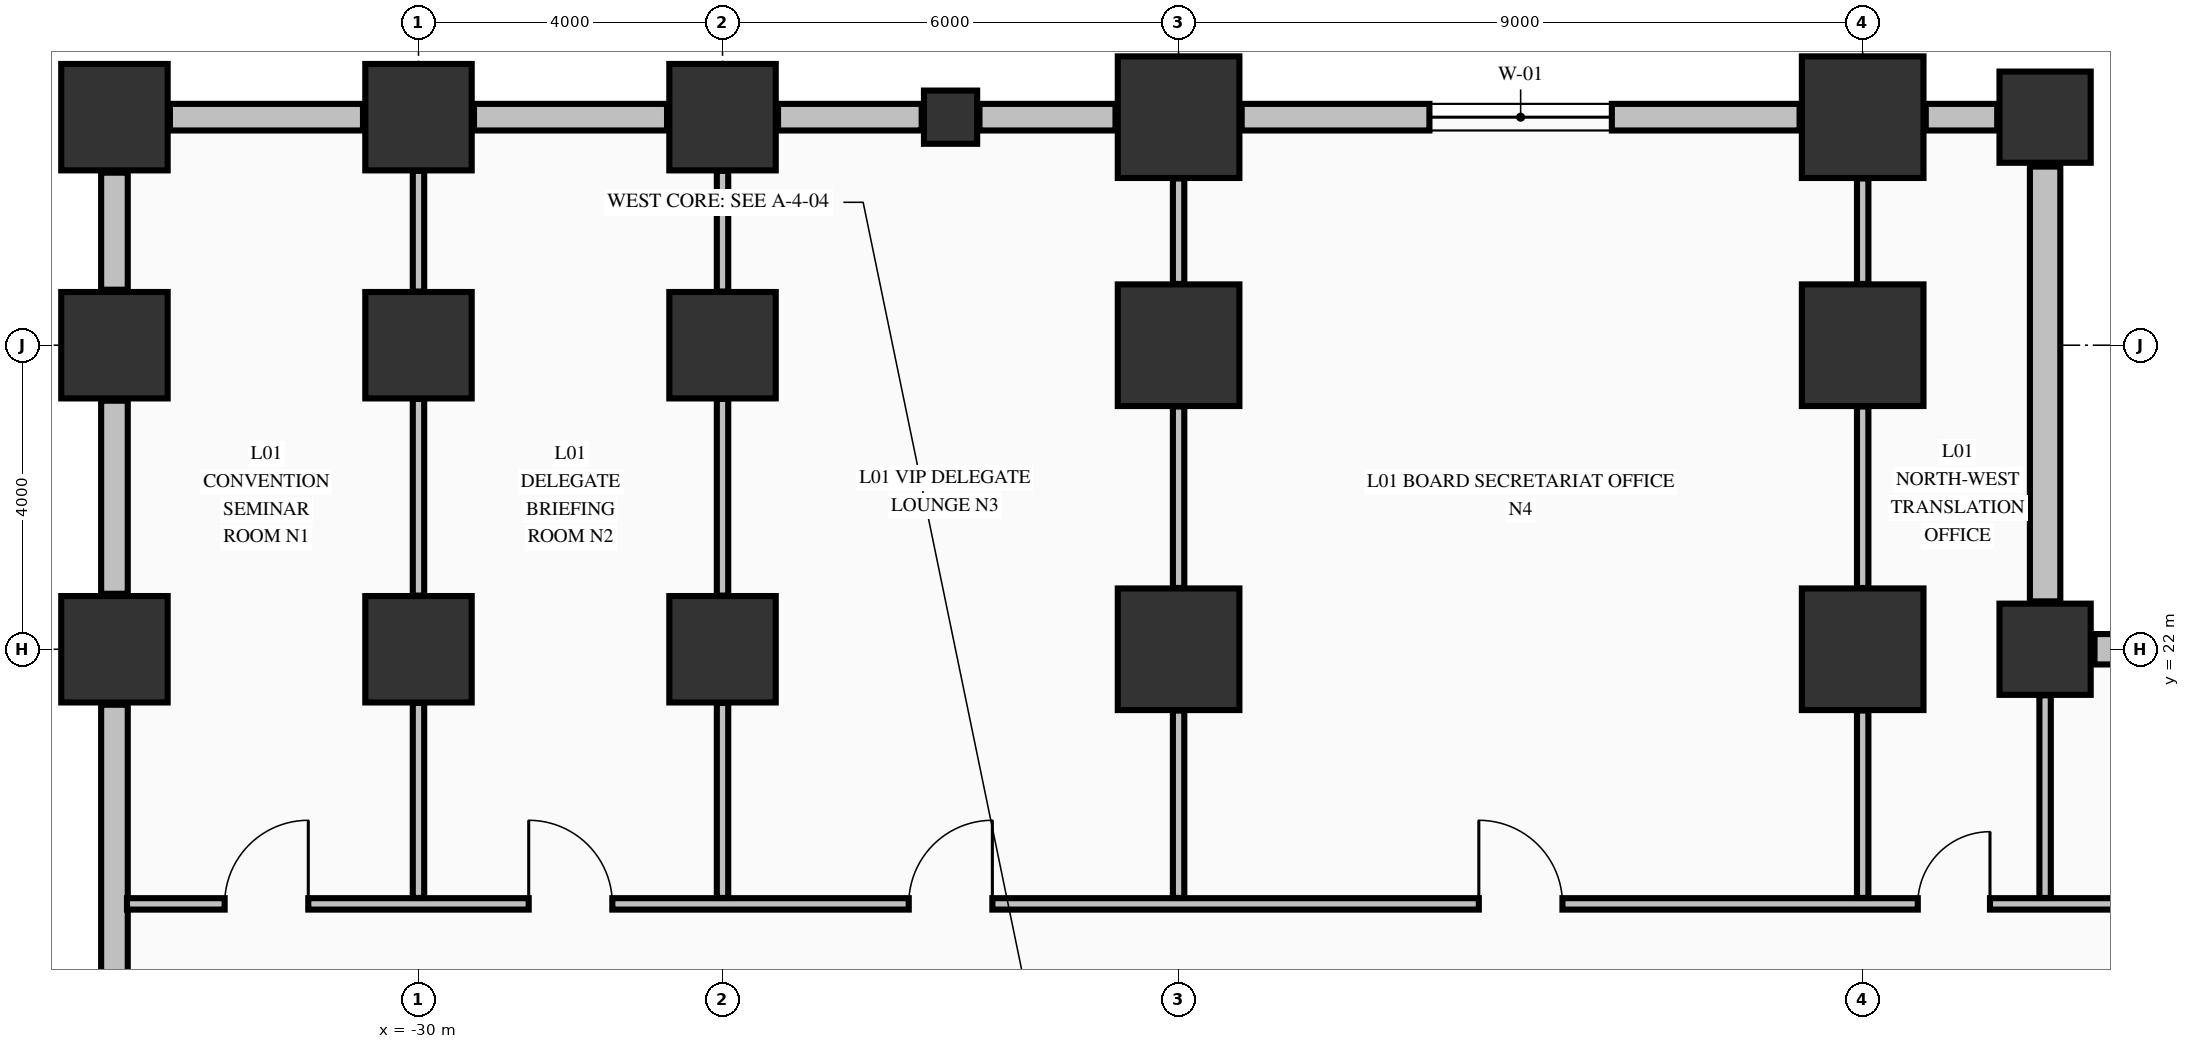
"""IFC4 building model, lengths in metres.
Left out: names, types, materials, properties, quantities, classifications, styles, units other than length and angle.
Written with IfcOpenShell. Run it as: python <this file> out.ifc"""

import sys

from ifc_helpers import new_model, si_unit, direction, frame, frame_2d, origin, origin_2d, place, context, subcontext, project, spatial, rectangle, extrude, element, fill, save


model = new_model("IFC4")
c1 = context("Model", 3, precision=1e-05, world=origin(), true_north=direction((0.0, 1.0)))
c2 = subcontext(c1, "Body", "Model", "MODEL_VIEW")
j1 = project(units=[si_unit("LENGTHUNIT", "METRE"), si_unit("PLANEANGLEUNIT", "RADIAN")], contexts=[c1])
p1 = place(None, origin())
s1 = spatial("IfcSite", under=j1, at=p1, CompositionType="ELEMENT")
p2 = place(p1, origin())
s2 = spatial("IfcBuilding", under=s1, at=p2, CompositionType="ELEMENT")
p3 = place(p2, frame((0.0, 0.0, 5.44)))
s3 = spatial("IfcBuildingStorey", under=s2, at=p3, CompositionType="ELEMENT", Elevation=5.44)
for number, where, z_axis, x_axis in (
    (1, (-34.0, 22.0, 0.0), (0.0, 0.0, 1.0), (1.0, 0.0, 0.0)),
    (2, (-34.0, 26.0, 0.0), (0.0, 0.0, 1.0), (1.0, 0.0, 0.0)),
    (3, (-34.0, 29.0, 0.0), (0.0, 0.0, 1.0), (1.0, 0.0, 0.0)),
    (4, (-30.0, 22.0, 0.0), (0.0, 0.0, 1.0), (1.0, 0.0, 0.0)),
    (5, (-30.0, 26.0, 0.0), (0.0, 0.0, 1.0), (1.0, 0.0, 0.0)),
    (6, (-30.0, 29.0, 0.0), (0.0, 0.0, 1.0), (1.0, 0.0, 0.0)),
    (7, (-26.0, 22.0, 0.0), (0.0, 0.0, 1.0), (1.0, 0.0, 0.0)),
    (8, (-26.0, 26.0, 0.0), (0.0, 0.0, 1.0), (1.0, 0.0, 0.0)),
    (9, (-26.0, 29.0, 0.0), (0.0, 0.0, 1.0), (1.0, 0.0, 0.0)),
):
    element("IfcColumn", number, at=place(p3, frame(where, z_axis=z_axis, x_axis=x_axis)), inside=s3, PredefinedType="COLUMN", context=c2, shape_type="SweptSolid", body=[
        extrude(rectangle(XDim=1.4, YDim=1.4, at=origin_2d()), origin(), (0.0, 0.0, 1.0), 5.09),
    ])
for number, where, z_axis, x_axis in (
    (10, (-20.0, 22.0, 0.0), (0.0, 0.0, 1.0), (1.0, 0.0, 0.0)),
    (11, (-20.0, 26.0, 0.0), (0.0, 0.0, 1.0), (1.0, 0.0, 0.0)),
    (12, (-20.0, 29.0, 0.0), (0.0, 0.0, 1.0), (1.0, 0.0, 0.0)),
    (13, (-11.0, 22.0, 0.0), (0.0, 0.0, 1.0), (1.0, 0.0, 0.0)),
    (14, (-11.0, 26.0, 0.0), (0.0, 0.0, 1.0), (1.0, 0.0, 0.0)),
    (15, (-11.0, 29.0, 0.0), (0.0, 0.0, 1.0), (1.0, 0.0, 0.0)),
):
    element("IfcColumn", number, at=place(p3, frame(where, z_axis=z_axis, x_axis=x_axis)), inside=s3, PredefinedType="COLUMN", context=c2, shape_type="SweptSolid", body=[
        extrude(rectangle(XDim=1.6, YDim=1.6, at=origin_2d()), origin(), (0.0, 0.0, 1.0), 5.09),
    ])
for number, where, z_axis, x_axis in (
    (16, (-8.6, 22.0, 0.0), (0.0, 0.0, 1.0), (1.0, 0.0, 0.0)),
    (17, (-8.6, 29.0, 0.0), (0.0, 0.0, 1.0), (1.0, 0.0, 0.0)),
):
    element("IfcColumn", number, at=place(p3, frame(where, z_axis=z_axis, x_axis=x_axis)), inside=s3, PredefinedType="COLUMN", context=c2, shape_type="SweptSolid", body=[
        extrude(rectangle(XDim=1.2, YDim=1.2, at=origin_2d()), origin(), (0.0, 0.0, 1.0), 5.09),
    ])
p4 = place(p3, frame((-23.0, 29.0, 0.0), z_axis=(0.0, 0.0, 1.0), x_axis=(1.0, 0.0, 0.0)))
e18 = element("IfcColumn", 18, at=p4, inside=s3, PredefinedType="PILASTER", context=c2, shape_type="SweptSolid", body=[
    extrude(rectangle(XDim=0.7, YDim=0.7, at=origin_2d()), origin(), (0.0, 0.0, 1.0), 5.09),
])
for number, where, z_axis, x_axis in (
    (19, (-30.73, 29.0, 0.0), (0.0, 0.0, 1.0), (-1.0, 0.0, 0.0)),
    (20, (-26.73, 29.0, 0.0), (0.0, 0.0, 1.0), (-1.0, 0.0, 0.0)),
):
    element("IfcWall", number, at=place(p3, frame(where, z_axis=z_axis, x_axis=x_axis)), inside=s3, PredefinedType="STANDARD", context=c2, shape_type="SweptSolid", body=[
        extrude(rectangle(XDim=2.54, YDim=0.35, at=frame_2d((1.27, 0.0))), origin(), (0.0, 0.0, 1.0), 4.482),
    ])
p5 = place(p3, frame((-23.38, 29.0, 0.0), z_axis=(0.0, 0.0, 1.0), x_axis=(-1.0, 0.0, 0.0)))
e21 = element("IfcWall", 21, at=p5, inside=s3, PredefinedType="STANDARD", context=c2, shape_type="SweptSolid", body=[
    extrude(rectangle(XDim=1.89, YDim=0.35, at=frame_2d((0.945, 0.0))), origin(), (0.0, 0.0, 1.0), 4.482),
])
p6 = place(p3, frame((-20.83, 29.0, 0.0), z_axis=(0.0, 0.0, 1.0), x_axis=(-1.0, 0.0, 0.0)))
e22 = element("IfcWall", 22, at=p6, inside=s3, PredefinedType="STANDARD", context=c2, shape_type="SweptSolid", body=[
    extrude(rectangle(XDim=1.79, YDim=0.35, at=frame_2d((0.895, 0.0))), origin(), (0.0, 0.0, 1.0), 4.482),
])
p7 = place(p3, frame((-11.83, 29.0, 0.0), z_axis=(0.0, 0.0, 1.0), x_axis=(-1.0, 0.0, 0.0)))
e23 = element("IfcWall", 23, at=p7, inside=s3, PredefinedType="STANDARD", context=c2, shape_type="SweptSolid", body=[
    extrude(rectangle(XDim=7.34, YDim=0.35, at=frame_2d((3.67, 0.0))), origin(), (0.0, 0.0, 1.0), 4.482),
])
p8 = place(p7, frame((2.47, 0.0, 0.85)))
e24 = element("IfcOpeningElement", 24, at=p8, cuts=e23, PredefinedType="OPENING", context=c2, shape_type="SweptSolid", body=[
    extrude(rectangle(XDim=2.4, YDim=2.1, at=frame_2d((1.2, 1.05))), frame((0.0, 0.185, 0.0), z_axis=(0.0, -1.0, 0.0), x_axis=(1.0, 0.0, 0.0)), (0.0, 0.0, 1.0), 0.37),
])
p9 = place(p3, frame((-9.23, 29.0, 0.0), z_axis=(0.0, 0.0, 1.0), x_axis=(-1.0, 0.0, 0.0)))
e25 = element("IfcWall", 25, at=p9, inside=s3, PredefinedType="STANDARD", context=c2, shape_type="SweptSolid", body=[
    extrude(rectangle(XDim=0.94, YDim=0.35, at=frame_2d((0.47, 0.0))), origin(), (0.0, 0.0, 1.0), 4.482),
])
p10 = place(p3, frame((-34.0, 16.73, 0.0), z_axis=(0.0, 0.0, 1.0), x_axis=(0.0, 1.0, 0.0)))
e26 = element("IfcWall", 26, at=p10, inside=s3, PredefinedType="STANDARD", context=c2, shape_type="SweptSolid", body=[
    extrude(rectangle(XDim=4.54, YDim=0.35, at=frame_2d((2.27, 0.0))), origin(), (0.0, 0.0, 1.0), 4.482),
])
p11 = place(p3, frame((-34.0, 22.73, 0.0), z_axis=(0.0, 0.0, 1.0), x_axis=(0.0, 1.0, 0.0)))
e27 = element("IfcWall", 27, at=p11, inside=s3, PredefinedType="STANDARD", context=c2, shape_type="SweptSolid", body=[
    extrude(rectangle(XDim=2.54, YDim=0.35, at=frame_2d((1.27, 0.0))), origin(), (0.0, 0.0, 1.0), 4.482),
])
p12 = place(p3, frame((-34.0, 26.73, 0.0), z_axis=(0.0, 0.0, 1.0), x_axis=(0.0, 1.0, 0.0)))
e28 = element("IfcWall", 28, at=p12, inside=s3, PredefinedType="STANDARD", context=c2, shape_type="SweptSolid", body=[
    extrude(rectangle(XDim=1.54, YDim=0.35, at=frame_2d((0.77, 0.0))), origin(), (0.0, 0.0, 1.0), 4.482),
])
p13 = place(p3, frame((-8.6, 22.63, 0.0), z_axis=(0.0, 0.0, 1.0), x_axis=(0.0, 1.0, 0.0)))
e29 = element("IfcWall", 29, at=p13, inside=s3, PredefinedType="STANDARD", context=c2, shape_type="SweptSolid", body=[
    extrude(rectangle(XDim=5.72, YDim=0.4, at=frame_2d((2.86, 0.0))), origin(), (0.0, 0.0, 1.0), 4.132),
])
p14 = place(p3, frame((7.95, 22.0, 0.0), z_axis=(0.0, 0.0, 1.0), x_axis=(-1.0, 0.0, 0.0)))
e30 = element("IfcWall", 30, at=p14, inside=s3, PredefinedType="STANDARD", context=c2, shape_type="SweptSolid", body=[
    extrude(rectangle(XDim=15.9, YDim=0.4, at=frame_2d((7.95, 0.0))), origin(), (0.0, 0.0, 1.0), 4.132),
])
p15 = place(p3, frame((-33.835, 18.65, 0.0), z_axis=(0.0, 0.0, 1.0), x_axis=(1.0, 0.0, 0.0)))
e31 = element("IfcWall", 31, at=p15, inside=s3, PredefinedType="PARTITIONING", context=c2, shape_type="SweptSolid", body=[
    extrude(rectangle(XDim=63.685, YDim=0.15, at=frame_2d((31.843, 0.0))), origin(), (0.0, 0.0, 1.0), 5.09),
])
p16 = place(p15, frame((1.285, 0.0, 0.0)))
e32 = element("IfcOpeningElement", 32, at=p16, cuts=e31, PredefinedType="OPENING", context=c2, shape_type="SweptSolid", body=[
    extrude(rectangle(XDim=1.1, YDim=2.15, at=frame_2d((0.55, 1.075))), frame((0.0, 0.085, 0.0), z_axis=(0.0, -1.0, 0.0), x_axis=(1.0, 0.0, 0.0)), (0.0, 0.0, 1.0), 0.17),
])
p17 = place(p15, frame((5.285, 0.0, 0.0)))
e33 = element("IfcOpeningElement", 33, at=p17, cuts=e31, PredefinedType="OPENING", context=c2, shape_type="SweptSolid", body=[
    extrude(rectangle(XDim=1.1, YDim=2.15, at=frame_2d((0.55, 1.075))), frame((0.0, 0.085, 0.0), z_axis=(0.0, -1.0, 0.0), x_axis=(1.0, 0.0, 0.0)), (0.0, 0.0, 1.0), 0.17),
])
p18 = place(p15, frame((10.285, 0.0, 0.0)))
e34 = element("IfcOpeningElement", 34, at=p18, cuts=e31, PredefinedType="OPENING", context=c2, shape_type="SweptSolid", body=[
    extrude(rectangle(XDim=1.1, YDim=2.15, at=frame_2d((0.55, 1.075))), frame((0.0, 0.085, 0.0), z_axis=(0.0, -1.0, 0.0), x_axis=(1.0, 0.0, 0.0)), (0.0, 0.0, 1.0), 0.17),
])
p19 = place(p15, frame((17.785, 0.0, 0.0)))
e35 = element("IfcOpeningElement", 35, at=p19, cuts=e31, PredefinedType="OPENING", context=c2, shape_type="SweptSolid", body=[
    extrude(rectangle(XDim=1.1, YDim=2.15, at=frame_2d((0.55, 1.075))), frame((0.0, 0.085, 0.0), z_axis=(0.0, -1.0, 0.0), x_axis=(1.0, 0.0, 0.0)), (0.0, 0.0, 1.0), 0.17),
])
p20 = place(p15, frame((23.56, 0.0, 0.0)))
e36 = element("IfcOpeningElement", 36, at=p20, cuts=e31, PredefinedType="OPENING", context=c2, shape_type="SweptSolid", body=[
    extrude(rectangle(XDim=0.95, YDim=2.15, at=frame_2d((0.475, 1.075))), frame((0.0, 0.085, 0.0), z_axis=(0.0, -1.0, 0.0), x_axis=(1.0, 0.0, 0.0)), (0.0, 0.0, 1.0), 0.17),
])
p21 = place(p15, frame((28.985, 0.0, 0.0)))
e37 = element("IfcOpeningElement", 37, at=p21, cuts=e31, PredefinedType="OPENING", context=c2, shape_type="SweptSolid", body=[
    extrude(rectangle(XDim=1.1, YDim=2.15, at=frame_2d((0.55, 1.075))), frame((0.0, 0.085, 0.0), z_axis=(0.0, -1.0, 0.0), x_axis=(1.0, 0.0, 0.0)), (0.0, 0.0, 1.0), 0.17),
])
p22 = place(p15, frame((37.585, 0.0, 0.0)))
e38 = element("IfcOpeningElement", 38, at=p22, cuts=e31, PredefinedType="OPENING", context=c2, shape_type="SweptSolid", body=[
    extrude(rectangle(XDim=1.1, YDim=2.15, at=frame_2d((0.55, 1.075))), frame((0.0, 0.085, 0.0), z_axis=(0.0, -1.0, 0.0), x_axis=(1.0, 0.0, 0.0)), (0.0, 0.0, 1.0), 0.17),
])
p23 = place(p15, frame((43.16, 0.0, 0.0)))
e39 = element("IfcOpeningElement", 39, at=p23, cuts=e31, PredefinedType="OPENING", context=c2, shape_type="SweptSolid", body=[
    extrude(rectangle(XDim=0.95, YDim=2.15, at=frame_2d((0.475, 1.075))), frame((0.0, 0.085, 0.0), z_axis=(0.0, -1.0, 0.0), x_axis=(1.0, 0.0, 0.0)), (0.0, 0.0, 1.0), 0.17),
])
p24 = place(p15, frame((61.31, 0.0, 0.0)))
e40 = element("IfcOpeningElement", 40, at=p24, cuts=e31, PredefinedType="OPENING", context=c2, shape_type="SweptSolid", body=[
    extrude(rectangle(XDim=0.95, YDim=2.15, at=frame_2d((0.475, 1.075))), frame((0.0, 0.085, 0.0), z_axis=(0.0, -1.0, 0.0), x_axis=(1.0, 0.0, 0.0)), (0.0, 0.0, 1.0), 0.17),
])
p25 = place(p15, frame((47.56, 0.0, 0.0)))
e41 = element("IfcOpeningElement", 41, at=p25, cuts=e31, PredefinedType="OPENING", context=c2, shape_type="SweptSolid", body=[
    extrude(rectangle(XDim=0.95, YDim=2.15, at=frame_2d((0.475, 1.075))), frame((0.0, 0.085, 0.0), z_axis=(0.0, -1.0, 0.0), x_axis=(1.0, 0.0, 0.0)), (0.0, 0.0, 1.0), 0.17),
])
p26 = place(p15, frame((51.31, 0.0, 0.0)))
e42 = element("IfcOpeningElement", 42, at=p26, cuts=e31, PredefinedType="OPENING", context=c2, shape_type="SweptSolid", body=[
    extrude(rectangle(XDim=1.05, YDim=2.15, at=frame_2d((0.525, 1.075))), frame((0.0, 0.085, 0.0), z_axis=(0.0, -1.0, 0.0), x_axis=(1.0, 0.0, 0.0)), (0.0, 0.0, 1.0), 0.17),
])
p27 = place(p15, frame((56.06, 0.0, 0.0)))
e43 = element("IfcOpeningElement", 43, at=p27, cuts=e31, PredefinedType="OPENING", context=c2, shape_type="SweptSolid", body=[
    extrude(rectangle(XDim=0.95, YDim=2.15, at=frame_2d((0.475, 1.075))), frame((0.0, 0.085, 0.0), z_axis=(0.0, -1.0, 0.0), x_axis=(1.0, 0.0, 0.0)), (0.0, 0.0, 1.0), 0.17),
])
p28 = place(p15, frame((58.535, 0.0, 0.0)))
e44 = element("IfcOpeningElement", 44, at=p28, cuts=e31, PredefinedType="OPENING", context=c2, shape_type="SweptSolid", body=[
    extrude(rectangle(XDim=0.9, YDim=2.15, at=frame_2d((0.45, 1.075))), frame((0.0, 0.085, 0.0), z_axis=(0.0, -1.0, 0.0), x_axis=(1.0, 0.0, 0.0)), (0.0, 0.0, 1.0), 0.17),
])
p29 = place(p3, frame((-30.0, 18.728, 0.0), z_axis=(0.0, 0.0, 1.0), x_axis=(0.0, 1.0, 0.0)))
e45 = element("IfcWall", 45, at=p29, inside=s3, PredefinedType="PARTITIONING", context=c2, shape_type="SweptSolid", body=[
    extrude(rectangle(XDim=2.566, YDim=0.15, at=frame_2d((1.283, 0.0))), origin(), (0.0, 0.0, 1.0), 4.132),
])
p30 = place(p3, frame((-30.0, 22.706, 0.0), z_axis=(0.0, 0.0, 1.0), x_axis=(0.0, 1.0, 0.0)))
e46 = element("IfcWall", 46, at=p30, inside=s3, PredefinedType="PARTITIONING", context=c2, shape_type="SweptSolid", body=[
    extrude(rectangle(XDim=2.588, YDim=0.15, at=frame_2d((1.294, 0.0))), origin(), (0.0, 0.0, 1.0), 4.132),
])
p31 = place(p3, frame((-30.0, 26.706, 0.0), z_axis=(0.0, 0.0, 1.0), x_axis=(0.0, 1.0, 0.0)))
e47 = element("IfcWall", 47, at=p31, inside=s3, PredefinedType="PARTITIONING", context=c2, shape_type="SweptSolid", body=[
    extrude(rectangle(XDim=1.588, YDim=0.15, at=frame_2d((0.794, 0.0))), origin(), (0.0, 0.0, 1.0), 4.132),
])
p32 = place(p3, frame((-26.0, 18.728, 0.0), z_axis=(0.0, 0.0, 1.0), x_axis=(0.0, 1.0, 0.0)))
e48 = element("IfcWall", 48, at=p32, inside=s3, PredefinedType="PARTITIONING", context=c2, shape_type="SweptSolid", body=[
    extrude(rectangle(XDim=2.566, YDim=0.15, at=frame_2d((1.283, 0.0))), origin(), (0.0, 0.0, 1.0), 4.132),
])
p33 = place(p3, frame((-26.0, 22.706, 0.0), z_axis=(0.0, 0.0, 1.0), x_axis=(0.0, 1.0, 0.0)))
e49 = element("IfcWall", 49, at=p33, inside=s3, PredefinedType="PARTITIONING", context=c2, shape_type="SweptSolid", body=[
    extrude(rectangle(XDim=2.588, YDim=0.15, at=frame_2d((1.294, 0.0))), origin(), (0.0, 0.0, 1.0), 4.132),
])
p34 = place(p3, frame((-26.0, 26.706, 0.0), z_axis=(0.0, 0.0, 1.0), x_axis=(0.0, 1.0, 0.0)))
e50 = element("IfcWall", 50, at=p34, inside=s3, PredefinedType="PARTITIONING", context=c2, shape_type="SweptSolid", body=[
    extrude(rectangle(XDim=1.588, YDim=0.15, at=frame_2d((0.794, 0.0))), origin(), (0.0, 0.0, 1.0), 4.132),
])
p35 = place(p3, frame((-20.0, 18.728, 0.0), z_axis=(0.0, 0.0, 1.0), x_axis=(0.0, 1.0, 0.0)))
e51 = element("IfcWall", 51, at=p35, inside=s3, PredefinedType="PARTITIONING", context=c2, shape_type="SweptSolid", body=[
    extrude(rectangle(XDim=2.466, YDim=0.15, at=frame_2d((1.233, 0.0))), origin(), (0.0, 0.0, 1.0), 4.132),
])
p36 = place(p3, frame((-20.0, 22.806, 0.0), z_axis=(0.0, 0.0, 1.0), x_axis=(0.0, 1.0, 0.0)))
e52 = element("IfcWall", 52, at=p36, inside=s3, PredefinedType="PARTITIONING", context=c2, shape_type="SweptSolid", body=[
    extrude(rectangle(XDim=2.388, YDim=0.15, at=frame_2d((1.194, 0.0))), origin(), (0.0, 0.0, 1.0), 4.132),
])
p37 = place(p3, frame((-20.0, 26.806, 0.0), z_axis=(0.0, 0.0, 1.0), x_axis=(0.0, 1.0, 0.0)))
e53 = element("IfcWall", 53, at=p37, inside=s3, PredefinedType="PARTITIONING", context=c2, shape_type="SweptSolid", body=[
    extrude(rectangle(XDim=1.388, YDim=0.15, at=frame_2d((0.694, 0.0))), origin(), (0.0, 0.0, 1.0), 4.132),
])
p38 = place(p3, frame((-11.0, 18.728, 0.0), z_axis=(0.0, 0.0, 1.0), x_axis=(0.0, 1.0, 0.0)))
e54 = element("IfcWall", 54, at=p38, inside=s3, PredefinedType="PARTITIONING", context=c2, shape_type="SweptSolid", body=[
    extrude(rectangle(XDim=2.466, YDim=0.15, at=frame_2d((1.233, 0.0))), origin(), (0.0, 0.0, 1.0), 4.132),
])
p39 = place(p3, frame((-11.0, 22.806, 0.0), z_axis=(0.0, 0.0, 1.0), x_axis=(0.0, 1.0, 0.0)))
e55 = element("IfcWall", 55, at=p39, inside=s3, PredefinedType="PARTITIONING", context=c2, shape_type="SweptSolid", body=[
    extrude(rectangle(XDim=2.388, YDim=0.15, at=frame_2d((1.194, 0.0))), origin(), (0.0, 0.0, 1.0), 4.132),
])
p40 = place(p3, frame((-11.0, 26.806, 0.0), z_axis=(0.0, 0.0, 1.0), x_axis=(0.0, 1.0, 0.0)))
e56 = element("IfcWall", 56, at=p40, inside=s3, PredefinedType="PARTITIONING", context=c2, shape_type="SweptSolid", body=[
    extrude(rectangle(XDim=1.388, YDim=0.15, at=frame_2d((0.694, 0.0))), origin(), (0.0, 0.0, 1.0), 4.132),
])
p41 = place(p3, frame((-8.6, 18.728, 0.0), z_axis=(0.0, 0.0, 1.0), x_axis=(0.0, 1.0, 0.0)))
e57 = element("IfcWall", 57, at=p41, inside=s3, PredefinedType="PARTITIONING", context=c2, shape_type="SweptSolid", body=[
    extrude(rectangle(XDim=2.666, YDim=0.15, at=frame_2d((1.333, 0.0))), origin(), (0.0, 0.0, 1.0), 4.132),
])
p42 = place(p8, origin())
e58 = element("IfcWindow", 58, at=p42, inside=s3, PartitioningType="SINGLE_PANEL", PredefinedType="WINDOW", context=c2, shape_type="SweptSolid", body=[
    extrude(rectangle(XDim=2.4, YDim=2.1, at=frame_2d((1.2, 1.05))), frame((0.0, 0.03, 0.0), z_axis=(0.0, -1.0, 0.0), x_axis=(1.0, 0.0, 0.0)), (0.0, 0.0, 1.0), 0.06),
])
fill(e24, e58)
p43 = place(p16, origin())
e59 = element("IfcDoor", 59, at=p43, inside=s3, OperationType="SINGLE_SWING_RIGHT", PredefinedType="DOOR", context=c2, shape_type="SweptSolid", body=[
    extrude(rectangle(XDim=1.1, YDim=2.15, at=frame_2d((0.55, 1.075))), frame((0.0, 0.025, 0.0), z_axis=(0.0, -1.0, 0.0), x_axis=(1.0, 0.0, 0.0)), (0.0, 0.0, 1.0), 0.05),
])
fill(e32, e59)
p44 = place(p17, origin())
e60 = element("IfcDoor", 60, at=p44, inside=s3, OperationType="SINGLE_SWING_LEFT", PredefinedType="DOOR", context=c2, shape_type="SweptSolid", body=[
    extrude(rectangle(XDim=1.1, YDim=2.15, at=frame_2d((0.55, 1.075))), frame((0.0, 0.025, 0.0), z_axis=(0.0, -1.0, 0.0), x_axis=(1.0, 0.0, 0.0)), (0.0, 0.0, 1.0), 0.05),
])
fill(e33, e60)
p45 = place(p18, origin())
e61 = element("IfcDoor", 61, at=p45, inside=s3, OperationType="SINGLE_SWING_RIGHT", PredefinedType="DOOR", context=c2, shape_type="SweptSolid", body=[
    extrude(rectangle(XDim=1.1, YDim=2.15, at=frame_2d((0.55, 1.075))), frame((0.0, 0.025, 0.0), z_axis=(0.0, -1.0, 0.0), x_axis=(1.0, 0.0, 0.0)), (0.0, 0.0, 1.0), 0.05),
])
fill(e34, e61)
p46 = place(p19, origin())
e62 = element("IfcDoor", 62, at=p46, inside=s3, OperationType="SINGLE_SWING_LEFT", PredefinedType="DOOR", context=c2, shape_type="SweptSolid", body=[
    extrude(rectangle(XDim=1.1, YDim=2.15, at=frame_2d((0.55, 1.075))), frame((0.0, 0.025, 0.0), z_axis=(0.0, -1.0, 0.0), x_axis=(1.0, 0.0, 0.0)), (0.0, 0.0, 1.0), 0.05),
])
fill(e35, e62)
p47 = place(p20, origin())
e63 = element("IfcDoor", 63, at=p47, inside=s3, OperationType="SINGLE_SWING_RIGHT", PredefinedType="DOOR", context=c2, shape_type="SweptSolid", body=[
    extrude(rectangle(XDim=0.95, YDim=2.15, at=frame_2d((0.475, 1.075))), frame((0.0, 0.025, 0.0), z_axis=(0.0, -1.0, 0.0), x_axis=(1.0, 0.0, 0.0)), (0.0, 0.0, 1.0), 0.05),
])
fill(e36, e63)
save(model, sys.argv[1])
